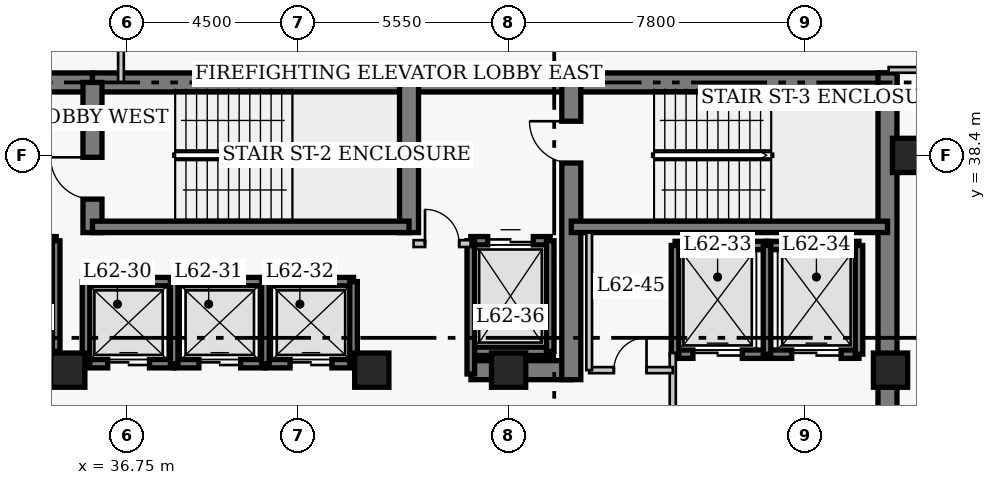
"""IFC4 building model, lengths in metres.
Left out: names, types, materials, properties, quantities, classifications, styles, units other than length and angle.
Written with IfcOpenShell. Run it as: python <this file> out.ifc"""

import sys

from ifc_helpers import new_model, si_unit, direction, frame, frame_2d, origin, origin_2d, place, context, subcontext, project, spatial, rectangle, extrude, element, fill, save


model = new_model("IFC4")
c1 = context("Model", 3, precision=1e-05, world=origin(), true_north=direction((0.0, 1.0)))
c2 = subcontext(c1, "Body", "Model", "MODEL_VIEW")
j1 = project(units=[si_unit("LENGTHUNIT", "METRE"), si_unit("PLANEANGLEUNIT", "RADIAN")], contexts=[c1])
p1 = place(None, origin())
s1 = spatial("IfcSite", under=j1, at=p1, CompositionType="ELEMENT")
p2 = place(p1, origin())
s2 = spatial("IfcBuilding", under=s1, at=p2, CompositionType="ELEMENT")
p3 = place(p2, frame((0.0, 0.0, 249.4)))
s3 = spatial("IfcBuildingStorey", under=s2, at=p3, CompositionType="ELEMENT", Elevation=249.4)
p4 = place(p3, frame((21.65, 40.32, 0.0), z_axis=(0.0, 0.0, 1.0), x_axis=(1.0, 0.0, 0.0)))
e1 = element("IfcWall", 1, at=p4, inside=s3, PredefinedType="SHEAR", context=c2, shape_type="SweptSolid", body=[
    extrude(rectangle(XDim=14.2, YDim=0.5, at=frame_2d((7.1, 0.0))), origin(), (0.0, 0.0, 1.0), 4.0),
])
p5 = place(p3, frame((35.85, 40.32, 0.0), z_axis=(0.0, 0.0, 1.0), x_axis=(1.0, 0.0, 0.0)))
e2 = element("IfcWall", 2, at=p5, inside=s3, PredefinedType="SHEAR", context=c2, shape_type="SweptSolid", body=[
    extrude(rectangle(XDim=12.6, YDim=0.5, at=frame_2d((6.3, 0.0))), origin(), (0.0, 0.0, 1.0), 4.0),
])
p6 = place(p3, frame((48.45, 40.32, 0.0), z_axis=(0.0, 0.0, 1.0), x_axis=(1.0, 0.0, 0.0)))
e3 = element("IfcWall", 3, at=p6, inside=s3, PredefinedType="SHEAR", context=c2, shape_type="SweptSolid", body=[
    extrude(rectangle(XDim=8.57, YDim=0.5, at=frame_2d((4.285, 0.0))), origin(), (0.0, 0.0, 1.0), 4.0),
])
p7 = place(p3, frame((56.77, 27.05, 0.0), z_axis=(0.0, 0.0, 1.0), x_axis=(0.0, 1.0, 0.0)))
e4 = element("IfcWall", 4, at=p7, inside=s3, PredefinedType="SHEAR", context=c2, shape_type="SweptSolid", body=[
    extrude(rectangle(XDim=13.52, YDim=0.5, at=frame_2d((6.76, 0.0))), origin(), (0.0, 0.0, 1.0), 4.0),
])
p8 = place(p3, frame((45.81, 32.75, 0.0), z_axis=(0.0, 0.0, 1.0), x_axis=(1.0, 0.0, 0.0)))
e5 = element("IfcWall", 5, at=p8, inside=s3, PredefinedType="SHEAR", context=c2, shape_type="SweptSolid", body=[
    extrude(rectangle(XDim=2.64, YDim=0.5, at=frame_2d((1.32, 0.0))), origin(), (0.0, 0.0, 1.0), 4.0),
])
p9 = place(p3, frame((35.85, 36.37, 0.0), z_axis=(0.0, 0.0, 1.0), x_axis=(0.0, 1.0, 0.0)))
e6 = element("IfcWall", 6, at=p9, inside=s3, PredefinedType="SHEAR", context=c2, shape_type="SweptSolid", body=[
    extrude(rectangle(XDim=3.95, YDim=0.5, at=frame_2d((1.975, 0.0))), origin(), (0.0, 0.0, 1.0), 4.0),
])
p10 = place(p9, frame((0.88, 0.0, 0.0)))
e7 = element("IfcOpeningElement", 7, at=p10, cuts=e6, PredefinedType="OPENING", context=c2, shape_type="SweptSolid", body=[
    extrude(rectangle(XDim=1.1, YDim=2.15, at=frame_2d((0.55, 1.075))), frame((0.0, 0.26, 0.0), z_axis=(0.0, -1.0, 0.0), x_axis=(1.0, 0.0, 0.0)), (0.0, 0.0, 1.0), 0.52),
])
p11 = place(p3, frame((44.18, 36.37, 0.0), z_axis=(0.0, 0.0, 1.0), x_axis=(0.0, 1.0, 0.0)))
e8 = element("IfcWall", 8, at=p11, inside=s3, PredefinedType="SHEAR", context=c2, shape_type="SweptSolid", body=[
    extrude(rectangle(XDim=3.95, YDim=0.5, at=frame_2d((1.975, 0.0))), origin(), (0.0, 0.0, 1.0), 4.0),
])
p12 = place(p3, frame((48.45, 32.5, 0.0), z_axis=(0.0, 0.0, 1.0), x_axis=(0.0, 1.0, 0.0)))
e9 = element("IfcWall", 9, at=p12, inside=s3, PredefinedType="SHEAR", context=c2, shape_type="SweptSolid", body=[
    extrude(rectangle(XDim=7.82, YDim=0.5, at=frame_2d((3.91, 0.0))), origin(), (0.0, 0.0, 1.0), 4.0),
])
p13 = place(p12, frame((5.7, 0.0, 0.0)))
e10 = element("IfcOpeningElement", 10, at=p13, cuts=e9, PredefinedType="OPENING", context=c2, shape_type="SweptSolid", body=[
    extrude(rectangle(XDim=1.1, YDim=2.15, at=frame_2d((0.55, 1.075))), frame((0.0, 0.26, 0.0), z_axis=(0.0, -1.0, 0.0), x_axis=(1.0, 0.0, 0.0)), (0.0, 0.0, 1.0), 0.52),
])
p14 = place(p3, frame((35.85, 36.52, 0.0), z_axis=(0.0, 0.0, 1.0), x_axis=(1.0, 0.0, 0.0)))
e11 = element("IfcWall", 11, at=p14, inside=s3, PredefinedType="SHEAR", context=c2, shape_type="SweptSolid", body=[
    extrude(rectangle(XDim=8.33, YDim=0.3, at=frame_2d((4.165, 0.0))), origin(), (0.0, 0.0, 1.0), 4.0),
])
p15 = place(p3, frame((48.45, 36.52, 0.0), z_axis=(0.0, 0.0, 1.0), x_axis=(1.0, 0.0, 0.0)))
e12 = element("IfcWall", 12, at=p15, inside=s3, PredefinedType="SHEAR", context=c2, shape_type="SweptSolid", body=[
    extrude(rectangle(XDim=8.32, YDim=0.3, at=frame_2d((4.16, 0.0))), origin(), (0.0, 0.0, 1.0), 4.0),
])
for number, where, z_axis, x_axis in (
    (13, (57.35, 38.4, 0.0), (0.0, 0.0, 1.0), (1.0, 0.0, 0.0)),
    (14, (35.2, 32.75, 0.0), (0.0, 0.0, 1.0), (1.0, 0.0, 0.0)),
    (15, (43.2, 32.75, 0.0), (0.0, 0.0, 1.0), (1.0, 0.0, 0.0)),
    (16, (46.8, 32.75, 0.0), (0.0, 0.0, 1.0), (1.0, 0.0, 0.0)),
    (17, (56.85, 32.75, 0.0), (0.0, 0.0, 1.0), (1.0, 0.0, 0.0)),
):
    element("IfcColumn", number, at=place(p3, frame(where, z_axis=z_axis, x_axis=x_axis)), inside=s3, PredefinedType="COLUMN", context=c2, shape_type="SweptSolid", body=[
        extrude(rectangle(XDim=0.9, YDim=0.9, at=origin_2d()), origin(), (0.0, 0.0, 1.0), 4.0),
    ])
p16 = place(p3, frame((35.68, 35.08, 0.0), z_axis=(0.0, 0.0, 1.0), x_axis=(1.0, 0.0, 0.0)))
e18 = element("IfcWall", 18, at=p16, inside=s3, PredefinedType="SHEAR", context=c2, shape_type="SweptSolid", body=[
    extrude(rectangle(XDim=2.32, YDim=0.22, at=frame_2d((1.16, 0.0))), origin(), (0.0, 0.0, 1.0), 4.0),
])
p17 = place(p3, frame((35.68, 32.92, 0.0), z_axis=(0.0, 0.0, 1.0), x_axis=(1.0, 0.0, 0.0)))
e19 = element("IfcWall", 19, at=p17, inside=s3, PredefinedType="SHEAR", context=c2, shape_type="SweptSolid", body=[
    extrude(rectangle(XDim=2.32, YDim=0.22, at=frame_2d((1.16, 0.0))), origin(), (0.0, 0.0, 1.0), 4.0),
])
p18 = place(p17, frame((0.57, 0.0, 0.0)))
e20 = element("IfcOpeningElement", 20, at=p18, cuts=e19, PredefinedType="OPENING", context=c2, shape_type="SweptSolid", body=[
    extrude(rectangle(XDim=1.1, YDim=2.15, at=frame_2d((0.55, 1.075))), frame((0.0, 0.12, 0.0), z_axis=(0.0, -1.0, 0.0), x_axis=(1.0, 0.0, 0.0)), (0.0, 0.0, 1.0), 0.24),
])
p19 = place(p3, frame((35.68, 32.92, 0.0), z_axis=(0.0, 0.0, 1.0), x_axis=(0.0, 1.0, 0.0)))
e21 = element("IfcWall", 21, at=p19, inside=s3, PredefinedType="SHEAR", context=c2, shape_type="SweptSolid", body=[
    extrude(rectangle(XDim=2.16, YDim=0.2, at=frame_2d((1.08, 0.0))), origin(), (0.0, 0.0, 1.0), 4.0),
])
p20 = place(p3, frame((38.0, 35.08, 0.0), z_axis=(0.0, 0.0, 1.0), x_axis=(1.0, 0.0, 0.0)))
e22 = element("IfcWall", 22, at=p20, inside=s3, PredefinedType="SHEAR", context=c2, shape_type="SweptSolid", body=[
    extrude(rectangle(XDim=2.4, YDim=0.22, at=frame_2d((1.2, 0.0))), origin(), (0.0, 0.0, 1.0), 4.0),
])
p21 = place(p3, frame((38.0, 32.92, 0.0), z_axis=(0.0, 0.0, 1.0), x_axis=(1.0, 0.0, 0.0)))
e23 = element("IfcWall", 23, at=p21, inside=s3, PredefinedType="SHEAR", context=c2, shape_type="SweptSolid", body=[
    extrude(rectangle(XDim=2.4, YDim=0.22, at=frame_2d((1.2, 0.0))), origin(), (0.0, 0.0, 1.0), 4.0),
])
p22 = place(p21, frame((0.65, 0.0, 0.0)))
e24 = element("IfcOpeningElement", 24, at=p22, cuts=e23, PredefinedType="OPENING", context=c2, shape_type="SweptSolid", body=[
    extrude(rectangle(XDim=1.1, YDim=2.15, at=frame_2d((0.55, 1.075))), frame((0.0, 0.12, 0.0), z_axis=(0.0, -1.0, 0.0), x_axis=(1.0, 0.0, 0.0)), (0.0, 0.0, 1.0), 0.24),
])
p23 = place(p3, frame((38.0, 32.92, 0.0), z_axis=(0.0, 0.0, 1.0), x_axis=(0.0, 1.0, 0.0)))
e25 = element("IfcWall", 25, at=p23, inside=s3, PredefinedType="SHEAR", context=c2, shape_type="SweptSolid", body=[
    extrude(rectangle(XDim=2.16, YDim=0.2, at=frame_2d((1.08, 0.0))), origin(), (0.0, 0.0, 1.0), 4.0),
])
p24 = place(p3, frame((40.4, 35.08, 0.0), z_axis=(0.0, 0.0, 1.0), x_axis=(1.0, 0.0, 0.0)))
e26 = element("IfcWall", 26, at=p24, inside=s3, PredefinedType="SHEAR", context=c2, shape_type="SweptSolid", body=[
    extrude(rectangle(XDim=2.32, YDim=0.22, at=frame_2d((1.16, 0.0))), origin(), (0.0, 0.0, 1.0), 4.0),
])
p25 = place(p3, frame((40.4, 32.92, 0.0), z_axis=(0.0, 0.0, 1.0), x_axis=(1.0, 0.0, 0.0)))
e27 = element("IfcWall", 27, at=p25, inside=s3, PredefinedType="SHEAR", context=c2, shape_type="SweptSolid", body=[
    extrude(rectangle(XDim=2.32, YDim=0.22, at=frame_2d((1.16, 0.0))), origin(), (0.0, 0.0, 1.0), 4.0),
])
p26 = place(p25, frame((0.65, 0.0, 0.0)))
e28 = element("IfcOpeningElement", 28, at=p26, cuts=e27, PredefinedType="OPENING", context=c2, shape_type="SweptSolid", body=[
    extrude(rectangle(XDim=1.1, YDim=2.15, at=frame_2d((0.55, 1.075))), frame((0.0, 0.12, 0.0), z_axis=(0.0, -1.0, 0.0), x_axis=(1.0, 0.0, 0.0)), (0.0, 0.0, 1.0), 0.24),
])
for number, where, z_axis, x_axis in (
    (29, (40.4, 32.92, 0.0), (0.0, 0.0, 1.0), (0.0, 1.0, 0.0)),
    (30, (42.72, 32.92, 0.0), (0.0, 0.0, 1.0), (0.0, 1.0, 0.0)),
):
    element("IfcWall", number, at=place(p3, frame(where, z_axis=z_axis, x_axis=x_axis)), inside=s3, PredefinedType="SHEAR", context=c2, shape_type="SweptSolid", body=[
        extrude(rectangle(XDim=2.16, YDim=0.2, at=frame_2d((1.08, 0.0))), origin(), (0.0, 0.0, 1.0), 4.0),
    ])
p27 = place(p3, frame((51.18, 36.03, 0.0), z_axis=(0.0, 0.0, 1.0), x_axis=(1.0, 0.0, 0.0)))
e31 = element("IfcWall", 31, at=p27, inside=s3, PredefinedType="SHEAR", context=c2, shape_type="SweptSolid", body=[
    extrude(rectangle(XDim=2.42, YDim=0.22, at=frame_2d((1.21, 0.0))), origin(), (0.0, 0.0, 1.0), 4.0),
])
p28 = place(p3, frame((51.18, 33.17, 0.0), z_axis=(0.0, 0.0, 1.0), x_axis=(1.0, 0.0, 0.0)))
e32 = element("IfcWall", 32, at=p28, inside=s3, PredefinedType="SHEAR", context=c2, shape_type="SweptSolid", body=[
    extrude(rectangle(XDim=2.42, YDim=0.22, at=frame_2d((1.21, 0.0))), origin(), (0.0, 0.0, 1.0), 4.0),
])
p29 = place(p28, frame((0.47, 0.0, 0.0)))
e33 = element("IfcOpeningElement", 33, at=p29, cuts=e32, PredefinedType="OPENING", context=c2, shape_type="SweptSolid", body=[
    extrude(rectangle(XDim=1.3, YDim=2.15, at=frame_2d((0.65, 1.075))), frame((0.0, 0.12, 0.0), z_axis=(0.0, -1.0, 0.0), x_axis=(1.0, 0.0, 0.0)), (0.0, 0.0, 1.0), 0.24),
])
p30 = place(p3, frame((51.18, 33.17, 0.0), z_axis=(0.0, 0.0, 1.0), x_axis=(0.0, 1.0, 0.0)))
e34 = element("IfcWall", 34, at=p30, inside=s3, PredefinedType="SHEAR", context=c2, shape_type="SweptSolid", body=[
    extrude(rectangle(XDim=2.86, YDim=0.2, at=frame_2d((1.43, 0.0))), origin(), (0.0, 0.0, 1.0), 4.0),
])
p31 = place(p3, frame((53.6, 36.03, 0.0), z_axis=(0.0, 0.0, 1.0), x_axis=(1.0, 0.0, 0.0)))
e35 = element("IfcWall", 35, at=p31, inside=s3, PredefinedType="SHEAR", context=c2, shape_type="SweptSolid", body=[
    extrude(rectangle(XDim=2.42, YDim=0.22, at=frame_2d((1.21, 0.0))), origin(), (0.0, 0.0, 1.0), 4.0),
])
p32 = place(p3, frame((53.6, 33.17, 0.0), z_axis=(0.0, 0.0, 1.0), x_axis=(1.0, 0.0, 0.0)))
e36 = element("IfcWall", 36, at=p32, inside=s3, PredefinedType="SHEAR", context=c2, shape_type="SweptSolid", body=[
    extrude(rectangle(XDim=2.42, YDim=0.22, at=frame_2d((1.21, 0.0))), origin(), (0.0, 0.0, 1.0), 4.0),
])
p33 = place(p32, frame((0.65, 0.0, 0.0)))
e37 = element("IfcOpeningElement", 37, at=p33, cuts=e36, PredefinedType="OPENING", context=c2, shape_type="SweptSolid", body=[
    extrude(rectangle(XDim=1.3, YDim=2.15, at=frame_2d((0.65, 1.075))), frame((0.0, 0.12, 0.0), z_axis=(0.0, -1.0, 0.0), x_axis=(1.0, 0.0, 0.0)), (0.0, 0.0, 1.0), 0.24),
])
for number, where, z_axis, x_axis in (
    (38, (53.6, 33.17, 0.0), (0.0, 0.0, 1.0), (0.0, 1.0, 0.0)),
    (39, (56.02, 33.17, 0.0), (0.0, 0.0, 1.0), (0.0, 1.0, 0.0)),
):
    element("IfcWall", number, at=place(p3, frame(where, z_axis=z_axis, x_axis=x_axis)), inside=s3, PredefinedType="SHEAR", context=c2, shape_type="SweptSolid", body=[
        extrude(rectangle(XDim=2.86, YDim=0.2, at=frame_2d((1.43, 0.0))), origin(), (0.0, 0.0, 1.0), 4.0),
    ])
p34 = place(p3, frame((32.805, 36.155, 0.0), z_axis=(0.0, 0.0, 1.0), x_axis=(1.0, 0.0, 0.0)))
e40 = element("IfcWall", 40, at=p34, inside=s3, PredefinedType="SHEAR", context=c2, shape_type="SweptSolid", body=[
    extrude(rectangle(XDim=2.09, YDim=0.22, at=frame_2d((1.045, 0.0))), origin(), (0.0, 0.0, 1.0), 4.0),
])
p35 = place(p34, frame((0.445, 0.0, 0.0)))
e41 = element("IfcOpeningElement", 41, at=p35, cuts=e40, PredefinedType="OPENING", context=c2, shape_type="SweptSolid", body=[
    extrude(rectangle(XDim=1.2, YDim=2.15, at=frame_2d((0.6, 1.075))), frame((0.0, 0.12, 0.0), z_axis=(0.0, -1.0, 0.0), x_axis=(1.0, 0.0, 0.0)), (0.0, 0.0, 1.0), 0.24),
])
p36 = place(p3, frame((32.805, 33.245, 0.0), z_axis=(0.0, 0.0, 1.0), x_axis=(1.0, 0.0, 0.0)))
e42 = element("IfcWall", 42, at=p36, inside=s3, PredefinedType="SHEAR", context=c2, shape_type="SweptSolid", body=[
    extrude(rectangle(XDim=2.09, YDim=0.22, at=frame_2d((1.045, 0.0))), origin(), (0.0, 0.0, 1.0), 4.0),
])
p37 = place(p3, frame((34.895, 33.245, 0.0), z_axis=(0.0, 0.0, 1.0), x_axis=(0.0, 1.0, 0.0)))
e43 = element("IfcWall", 43, at=p37, inside=s3, PredefinedType="SHEAR", context=c2, shape_type="SweptSolid", body=[
    extrude(rectangle(XDim=2.91, YDim=0.2, at=frame_2d((1.455, 0.0))), origin(), (0.0, 0.0, 1.0), 4.0),
])
p38 = place(p3, frame((45.805, 36.155, 0.0), z_axis=(0.0, 0.0, 1.0), x_axis=(1.0, 0.0, 0.0)))
e44 = element("IfcWall", 44, at=p38, inside=s3, PredefinedType="SHEAR", context=c2, shape_type="SweptSolid", body=[
    extrude(rectangle(XDim=2.09, YDim=0.22, at=frame_2d((1.045, 0.0))), origin(), (0.0, 0.0, 1.0), 4.0),
])
p39 = place(p38, frame((0.445, 0.0, 0.0)))
e45 = element("IfcOpeningElement", 45, at=p39, cuts=e44, PredefinedType="OPENING", context=c2, shape_type="SweptSolid", body=[
    extrude(rectangle(XDim=1.2, YDim=2.15, at=frame_2d((0.6, 1.075))), frame((0.0, 0.12, 0.0), z_axis=(0.0, -1.0, 0.0), x_axis=(1.0, 0.0, 0.0)), (0.0, 0.0, 1.0), 0.24),
])
p40 = place(p3, frame((45.805, 33.245, 0.0), z_axis=(0.0, 0.0, 1.0), x_axis=(1.0, 0.0, 0.0)))
e46 = element("IfcWall", 46, at=p40, inside=s3, PredefinedType="SHEAR", context=c2, shape_type="SweptSolid", body=[
    extrude(rectangle(XDim=2.09, YDim=0.22, at=frame_2d((1.045, 0.0))), origin(), (0.0, 0.0, 1.0), 4.0),
])
p41 = place(p3, frame((45.805, 32.65, 0.0), z_axis=(0.0, 0.0, 1.0), x_axis=(0.0, 1.0, 0.0)))
e47 = element("IfcWall", 47, at=p41, inside=s3, PredefinedType="SHEAR", context=c2, shape_type="SweptSolid", body=[
    extrude(rectangle(XDim=3.505, YDim=0.2, at=frame_2d((1.752, 0.0))), origin(), (0.0, 0.0, 1.0), 4.0),
])
p42 = place(p3, frame((47.895, 33.245, 0.0), z_axis=(0.0, 0.0, 1.0), x_axis=(0.0, 1.0, 0.0)))
e48 = element("IfcWall", 48, at=p42, inside=s3, PredefinedType="SHEAR", context=c2, shape_type="SweptSolid", body=[
    extrude(rectangle(XDim=2.91, YDim=0.2, at=frame_2d((1.455, 0.0))), origin(), (0.0, 0.0, 1.0), 4.0),
])
p43 = place(p3, frame((44.3, 36.08, 0.0), z_axis=(0.0, 0.0, 1.0), x_axis=(1.0, 0.0, 0.0)))
e49 = element("IfcWall", 49, at=p43, inside=s3, PredefinedType="PARTITIONING", context=c2, shape_type="SweptSolid", body=[
    extrude(rectangle(XDim=1.5, YDim=0.18, at=frame_2d((0.75, 0.0))), origin(), (0.0, 0.0, 1.0), 3.76),
])
p44 = place(p43, frame((0.3, 0.0, 0.0)))
e50 = element("IfcOpeningElement", 50, at=p44, cuts=e49, PredefinedType="OPENING", context=c2, shape_type="SweptSolid", body=[
    extrude(rectangle(XDim=0.9, YDim=2.15, at=frame_2d((0.45, 1.075))), frame((0.0, 0.1, 0.0), z_axis=(0.0, -1.0, 0.0), x_axis=(1.0, 0.0, 0.0)), (0.0, 0.0, 1.0), 0.2),
])
p45 = place(p3, frame((51.12, 29.5, 0.0), z_axis=(0.0, 0.0, 1.0), x_axis=(0.0, 1.0, 0.0)))
e51 = element("IfcWall", 51, at=p45, inside=s3, PredefinedType="PARTITIONING", context=c2, shape_type="SweptSolid", body=[
    extrude(rectangle(XDim=3.7, YDim=0.16, at=frame_2d((1.85, 0.0))), origin(), (0.0, 0.0, 1.0), 3.76),
])
p46 = place(p45, frame((0.9, 0.0, 0.0)))
e52 = element("IfcOpeningElement", 52, at=p46, cuts=e51, PredefinedType="OPENING", context=c2, shape_type="SweptSolid", body=[
    extrude(rectangle(XDim=1.1, YDim=2.15, at=frame_2d((0.55, 1.075))), frame((0.0, 0.09, 0.0), z_axis=(0.0, -1.0, 0.0), x_axis=(1.0, 0.0, 0.0)), (0.0, 0.0, 1.0), 0.18),
])
p47 = place(p3, frame((48.92, 32.75, 0.0), z_axis=(0.0, 0.0, 1.0), x_axis=(1.0, 0.0, 0.0)))
e53 = element("IfcWall", 53, at=p47, inside=s3, PredefinedType="PARTITIONING", context=c2, shape_type="SweptSolid", body=[
    extrude(rectangle(XDim=2.2, YDim=0.16, at=frame_2d((1.1, 0.0))), origin(), (0.0, 0.0, 1.0), 3.76),
])
p48 = place(p47, frame((0.65, 0.0, 0.0)))
e54 = element("IfcOpeningElement", 54, at=p48, cuts=e53, PredefinedType="OPENING", context=c2, shape_type="SweptSolid", body=[
    extrude(rectangle(XDim=0.86, YDim=2.05, at=frame_2d((0.43, 1.025))), frame((0.0, 0.09, 0.0), z_axis=(0.0, -1.0, 0.0), x_axis=(1.0, 0.0, 0.0)), (0.0, 0.0, 1.0), 0.18),
])
p49 = place(p3, frame((48.92, 32.75, 0.0), z_axis=(0.0, 0.0, 1.0), x_axis=(0.0, 1.0, 0.0)))
e55 = element("IfcWall", 55, at=p49, inside=s3, PredefinedType="PARTITIONING", context=c2, shape_type="SweptSolid", body=[
    extrude(rectangle(XDim=3.62, YDim=0.15, at=frame_2d((1.81, 0.0))), origin(), (0.0, 0.0, 1.0), 3.76),
])
p50 = place(p3, frame((56.8, 40.65, 0.0), z_axis=(0.0, 0.0, 1.0), x_axis=(1.0, 0.0, 0.0)))
e56 = element("IfcWall", 56, at=p50, inside=s3, PredefinedType="PARTITIONING", context=c2, shape_type="SweptSolid", body=[
    extrude(rectangle(XDim=4.36, YDim=0.15, at=frame_2d((2.18, 0.0))), origin(), (0.0, 0.0, 1.0), 3.76),
])
p51 = place(p50, frame((2.75, 0.0, 0.0)))
e57 = element("IfcOpeningElement", 57, at=p51, cuts=e56, PredefinedType="OPENING", context=c2, shape_type="SweptSolid", body=[
    extrude(rectangle(XDim=1.0, YDim=2.15, at=frame_2d((0.5, 1.075))), frame((0.0, 0.085, 0.0), z_axis=(0.0, -1.0, 0.0), x_axis=(1.0, 0.0, 0.0)), (0.0, 0.0, 1.0), 0.17),
])
p52 = place(p3, frame((36.6, 40.32, 0.0), z_axis=(0.0, 0.0, 1.0), x_axis=(0.0, 1.0, 0.0)))
e58 = element("IfcWall", 58, at=p52, inside=s3, PredefinedType="PARTITIONING", context=c2, shape_type="SweptSolid", body=[
    extrude(rectangle(XDim=3.545, YDim=0.15, at=frame_2d((1.772, 0.0))), origin(), (0.0, 0.0, 1.0), 3.76),
])
p53 = place(p18, origin())
e59 = element("IfcDoor", 59, at=p53, inside=s3, OperationType="DOUBLE_DOOR_SLIDING", PredefinedType="DOOR", context=c2, shape_type="SweptSolid", body=[
    extrude(rectangle(XDim=1.1, YDim=2.15, at=frame_2d((0.55, 1.075))), frame((0.0, 0.025, 0.0), z_axis=(0.0, -1.0, 0.0), x_axis=(1.0, 0.0, 0.0)), (0.0, 0.0, 1.0), 0.05),
])
fill(e20, e59)
p54 = place(p22, origin())
e60 = element("IfcDoor", 60, at=p54, inside=s3, OperationType="DOUBLE_DOOR_SLIDING", PredefinedType="DOOR", context=c2, shape_type="SweptSolid", body=[
    extrude(rectangle(XDim=1.1, YDim=2.15, at=frame_2d((0.55, 1.075))), frame((0.0, 0.025, 0.0), z_axis=(0.0, -1.0, 0.0), x_axis=(1.0, 0.0, 0.0)), (0.0, 0.0, 1.0), 0.05),
])
fill(e24, e60)
p55 = place(p26, origin())
e61 = element("IfcDoor", 61, at=p55, inside=s3, OperationType="DOUBLE_DOOR_SLIDING", PredefinedType="DOOR", context=c2, shape_type="SweptSolid", body=[
    extrude(rectangle(XDim=1.1, YDim=2.15, at=frame_2d((0.55, 1.075))), frame((0.0, 0.025, 0.0), z_axis=(0.0, -1.0, 0.0), x_axis=(1.0, 0.0, 0.0)), (0.0, 0.0, 1.0), 0.05),
])
fill(e28, e61)
p56 = place(p29, origin())
e62 = element("IfcDoor", 62, at=p56, inside=s3, OperationType="DOUBLE_DOOR_SLIDING", PredefinedType="DOOR", context=c2, shape_type="SweptSolid", body=[
    extrude(rectangle(XDim=1.3, YDim=2.15, at=frame_2d((0.65, 1.075))), frame((0.0, 0.025, 0.0), z_axis=(0.0, -1.0, 0.0), x_axis=(1.0, 0.0, 0.0)), (0.0, 0.0, 1.0), 0.05),
])
fill(e33, e62)
p57 = place(p33, origin())
e63 = element("IfcDoor", 63, at=p57, inside=s3, OperationType="DOUBLE_DOOR_SLIDING", PredefinedType="DOOR", context=c2, shape_type="SweptSolid", body=[
    extrude(rectangle(XDim=1.3, YDim=2.15, at=frame_2d((0.65, 1.075))), frame((0.0, 0.025, 0.0), z_axis=(0.0, -1.0, 0.0), x_axis=(1.0, 0.0, 0.0)), (0.0, 0.0, 1.0), 0.05),
])
fill(e37, e63)
p58 = place(p39, origin())
e64 = element("IfcDoor", 64, at=p58, inside=s3, OperationType="DOUBLE_DOOR_SLIDING", PredefinedType="DOOR", context=c2, shape_type="SweptSolid", body=[
    extrude(rectangle(XDim=1.2, YDim=2.15, at=frame_2d((0.6, 1.075))), frame((0.0, 0.025, 0.0), z_axis=(0.0, -1.0, 0.0), x_axis=(1.0, 0.0, 0.0)), (0.0, 0.0, 1.0), 0.05),
])
fill(e45, e64)
p59 = place(p44, origin())
e65 = element("IfcDoor", 65, at=p59, inside=s3, OperationType="SINGLE_SWING_LEFT", PredefinedType="DOOR", context=c2, shape_type="SweptSolid", body=[
    extrude(rectangle(XDim=0.9, YDim=2.15, at=frame_2d((0.45, 1.075))), frame((0.0, 0.025, 0.0), z_axis=(0.0, -1.0, 0.0), x_axis=(1.0, 0.0, 0.0)), (0.0, 0.0, 1.0), 0.05),
])
fill(e50, e65)
p60 = place(p48, origin())
e66 = element("IfcDoor", 66, at=p60, inside=s3, OperationType="SINGLE_SWING_RIGHT", PredefinedType="DOOR", context=c2, shape_type="SweptSolid", body=[
    extrude(rectangle(XDim=0.86, YDim=2.05, at=frame_2d((0.43, 1.025))), frame((0.0, 0.025, 0.0), z_axis=(0.0, -1.0, 0.0), x_axis=(1.0, 0.0, 0.0)), (0.0, 0.0, 1.0), 0.05),
])
fill(e54, e66)
p61 = place(p10, origin())
e67 = element("IfcDoor", 67, at=p61, inside=s3, OperationType="SINGLE_SWING_RIGHT", PredefinedType="DOOR", context=c2, shape_type="SweptSolid", body=[
    extrude(rectangle(XDim=1.1, YDim=2.15, at=frame_2d((0.55, 1.075))), frame((0.0, 0.025, 0.0), z_axis=(0.0, -1.0, 0.0), x_axis=(1.0, 0.0, 0.0)), (0.0, 0.0, 1.0), 0.05),
])
fill(e7, e67)
p62 = place(p13, origin())
e68 = element("IfcDoor", 68, at=p62, inside=s3, OperationType="SINGLE_SWING_RIGHT", PredefinedType="DOOR", context=c2, shape_type="SweptSolid", body=[
    extrude(rectangle(XDim=1.1, YDim=2.15, at=frame_2d((0.55, 1.075))), frame((0.0, 0.025, 0.0), z_axis=(0.0, -1.0, 0.0), x_axis=(1.0, 0.0, 0.0)), (0.0, 0.0, 1.0), 0.05),
])
fill(e10, e68)
save(model, sys.argv[1])
